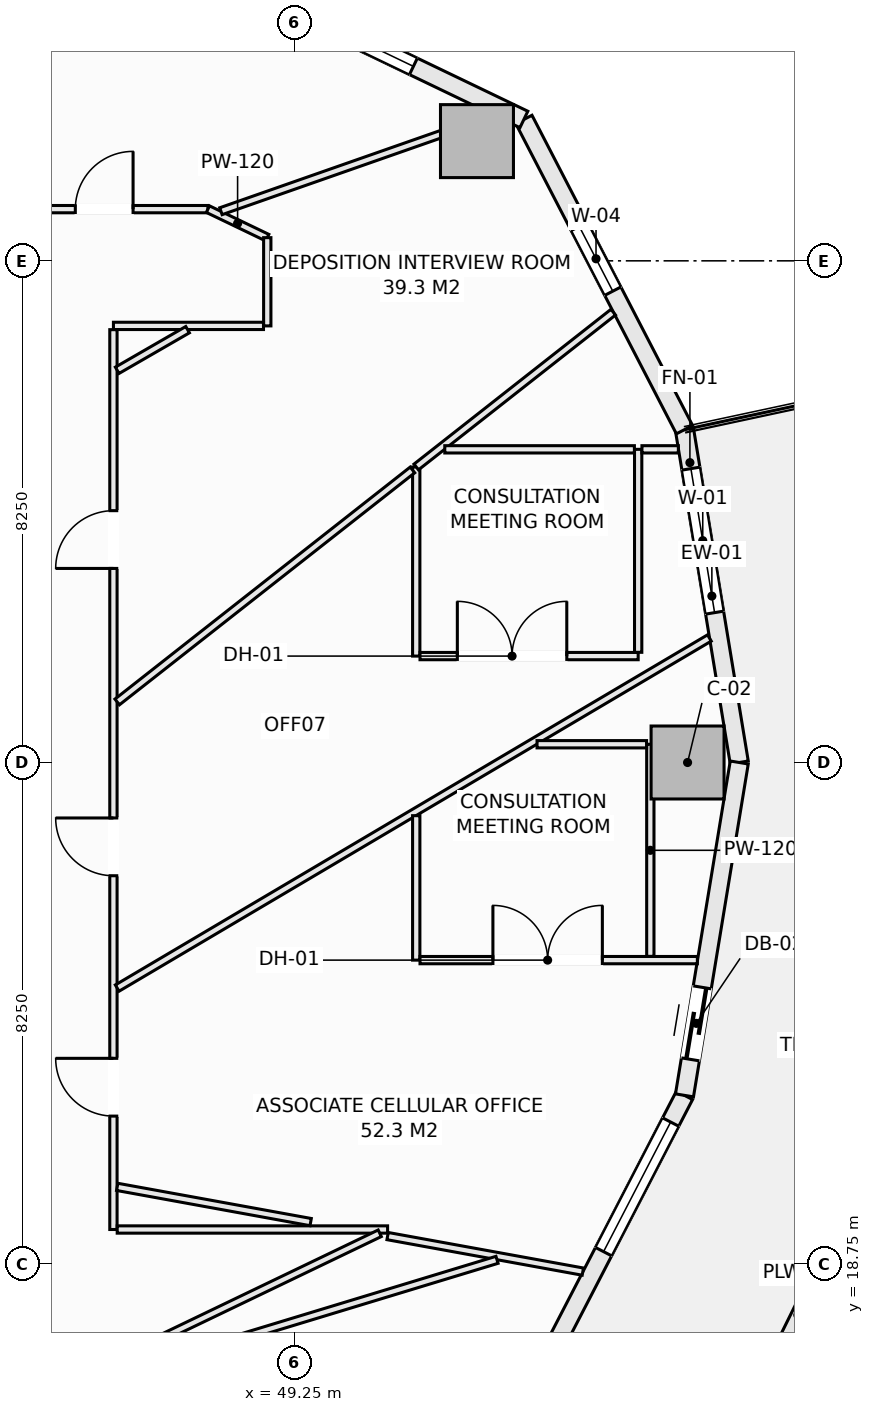
"""IFC4 building model, lengths in metres.
Left out: names, types, materials, properties, quantities, classifications, styles, units other than length and angle.
Written with IfcOpenShell. Run it as: python <this file> out.ifc"""

import sys

from ifc_helpers import new_model, si_unit, direction, frame, frame_2d, origin, origin_2d, place, context, subcontext, project, spatial, rectangle, extrude, element, fill, save


model = new_model("IFC4")
c1 = context("Model", 3, precision=1e-05, world=origin(), true_north=direction((0.0, 1.0)))
c2 = subcontext(c1, "Body", "Model", "MODEL_VIEW")
j1 = project(units=[si_unit("LENGTHUNIT", "METRE"), si_unit("PLANEANGLEUNIT", "RADIAN")], contexts=[c1])
p1 = place(None, origin())
s1 = spatial("IfcSite", under=j1, at=p1, CompositionType="ELEMENT")
p2 = place(p1, origin())
s2 = spatial("IfcBuilding", under=s1, at=p2, CompositionType="ELEMENT")
p3 = place(p2, frame((0.0, 0.0, 65.0)))
s3 = spatial("IfcBuildingStorey", under=s2, at=p3, CompositionType="ELEMENT", Elevation=65.0)
for number, where, z_axis, x_axis in (
    (1, (55.712, 27.0, -0.28), (0.0, 0.0, 1.0), (1.0, 0.0, 0.0)),
    (2, (52.249, 37.219, -0.28), (0.0, 0.0, 1.0), (1.0, 0.0, 0.0)),
):
    element("IfcColumn", number, at=place(p3, frame(where, z_axis=z_axis, x_axis=x_axis)), inside=s3, PredefinedType="COLUMN", context=c2, shape_type="SweptSolid", body=[
        extrude(rectangle(XDim=1.2, YDim=1.2, at=origin_2d()), origin(), (0.0, 0.0, 1.0), 3.85),
    ])
p4 = place(p3, frame((55.662, 32.474, 0.0), z_axis=(0.0, 0.0, 1.0), x_axis=(0.162386212206, -0.986727276447, 0.0)))
e3 = element("IfcWall", 3, at=p4, inside=s3, PredefinedType="SOLIDWALL", context=c2, shape_type="SweptSolid", body=[
    extrude(rectangle(XDim=5.548, YDim=0.3, at=frame_2d((2.774, 0.0))), origin(), (0.0, 0.0, 1.0), 3.093),
])
p5 = place(p4, frame((0.65, 0.0, 0.85)))
e4 = element("IfcOpeningElement", 4, at=p5, cuts=e3, PredefinedType="OPENING", context=c2, shape_type="SweptSolid", body=[
    extrude(rectangle(XDim=2.4, YDim=1.9, at=frame_2d((1.2, 0.95))), frame((0.0, 0.16, 0.0), z_axis=(0.0, -1.0, 0.0), x_axis=(1.0, 0.0, 0.0)), (0.0, 0.0, 1.0), 0.32),
])
p6 = place(p3, frame((53.021, 37.575, 0.0), z_axis=(0.0, 0.0, 1.0), x_axis=(0.459800981414, -0.888021991558, 0.0)))
e5 = element("IfcWall", 5, at=p6, inside=s3, PredefinedType="SOLIDWALL", context=c2, shape_type="SweptSolid", body=[
    extrude(rectangle(XDim=5.744, YDim=0.3, at=frame_2d((2.872, 0.0))), origin(), (0.0, 0.0, 1.0), 3.093),
])
p7 = place(p6, frame((1.98, 0.0, 0.72)))
e6 = element("IfcOpeningElement", 6, at=p7, cuts=e5, PredefinedType="OPENING", context=c2, shape_type="SweptSolid", body=[
    extrude(rectangle(XDim=1.2, YDim=1.65, at=frame_2d((0.6, 0.825))), frame((0.0, 0.16, 0.0), z_axis=(0.0, -1.0, 0.0), x_axis=(1.0, 0.0, 0.0)), (0.0, 0.0, 1.0), 0.32),
])
p8 = place(p3, frame((47.224, 40.36, 0.0), z_axis=(0.0, 0.0, 1.0), x_axis=(0.901354747727, -0.433081538224, 0.0)))
e7 = element("IfcWall", 7, at=p8, inside=s3, PredefinedType="SOLIDWALL", context=c2, shape_type="SweptSolid", body=[
    extrude(rectangle(XDim=6.431, YDim=0.3, at=frame_2d((3.215, 0.0))), origin(), (0.0, 0.0, 1.0), 3.093),
])
p9 = place(p8, frame((2.015, 0.0, 0.85)))
e8 = element("IfcOpeningElement", 8, at=p9, cuts=e7, PredefinedType="OPENING", context=c2, shape_type="SweptSolid", body=[
    extrude(rectangle(XDim=2.4, YDim=1.9, at=frame_2d((1.2, 0.95))), frame((0.0, 0.16, 0.0), z_axis=(0.0, -1.0, 0.0), x_axis=(1.0, 0.0, 0.0)), (0.0, 0.0, 1.0), 0.32),
])
p10 = place(p3, frame((53.021, 16.425, 0.0), z_axis=(0.0, 0.0, 1.0), x_axis=(0.459800981414, 0.888021991558, 0.0)))
e9 = element("IfcWall", 9, at=p10, inside=s3, PredefinedType="SOLIDWALL", context=c2, shape_type="SweptSolid", body=[
    extrude(rectangle(XDim=5.744, YDim=0.3, at=frame_2d((2.872, 0.0))), origin(), (0.0, 0.0, 1.0), 3.093),
])
p11 = place(p10, frame((2.85, 0.0, 0.85)))
e10 = element("IfcOpeningElement", 10, at=p11, cuts=e9, PredefinedType="OPENING", context=c2, shape_type="SweptSolid", body=[
    extrude(rectangle(XDim=2.4, YDim=1.9, at=frame_2d((1.2, 0.95))), frame((0.0, 0.16, 0.0), z_axis=(0.0, -1.0, 0.0), x_axis=(1.0, 0.0, 0.0)), (0.0, 0.0, 1.0), 0.32),
])
p12 = place(p3, frame((55.662, 21.526, 0.0), z_axis=(0.0, 0.0, 1.0), x_axis=(0.162386212206, 0.986727276447, 0.0)))
e11 = element("IfcWall", 11, at=p12, inside=s3, PredefinedType="SOLIDWALL", context=c2, shape_type="SweptSolid", body=[
    extrude(rectangle(XDim=5.548, YDim=0.3, at=frame_2d((2.774, 0.0))), origin(), (0.0, 0.0, 1.0), 3.093),
])
p13 = place(p12, frame((0.6, 0.0, 0.0)))
e12 = element("IfcOpeningElement", 12, at=p13, cuts=e11, PredefinedType="OPENING", context=c2, shape_type="SweptSolid", body=[
    extrude(rectangle(XDim=1.2, YDim=2.2, at=frame_2d((0.6, 1.1))), frame((0.0, 0.16, 0.0), z_axis=(0.0, -1.0, 0.0), x_axis=(1.0, 0.0, 0.0)), (0.0, 0.0, 1.0), 0.32),
])
p14 = place(p3, frame((56.077, 14.979, 0.0), z_axis=(0.0, 0.0, 1.0), x_axis=(0.442686636348, 0.89667638644, 0.0)))
e13 = element("IfcWall", 13, at=p14, inside=s3, PredefinedType="PARAPET", context=c2, shape_type="SweptSolid", body=[
    extrude(rectangle(XDim=6.545, YDim=0.22, at=frame_2d((3.272, 0.0))), origin(), (0.0, 0.0, 1.0), 0.52),
])
p15 = place(p3, frame((44.412, 36.1, 0.0), z_axis=(0.0, 0.0, 1.0), x_axis=(1.0, 0.0, 0.0)))
e14 = element("IfcWall", 14, at=p15, inside=s3, PredefinedType="PARTITIONING", context=c2, shape_type="SweptSolid", body=[
    extrude(rectangle(XDim=3.412, YDim=0.12, at=frame_2d((1.706, 0.0))), origin(), (0.0, 0.0, 1.0), 3.57),
])
p16 = place(p15, frame((1.231, 0.0, 0.0)))
e15 = element("IfcOpeningElement", 15, at=p16, cuts=e14, PredefinedType="OPENING", context=c2, shape_type="SweptSolid", body=[
    extrude(rectangle(XDim=0.95, YDim=2.1, at=frame_2d((0.475, 1.05))), frame((0.0, 0.07, 0.0), z_axis=(0.0, -1.0, 0.0), x_axis=(1.0, 0.0, 0.0)), (0.0, 0.0, 1.0), 0.14),
])
p17 = place(p3, frame((47.824, 36.1, 0.0), z_axis=(0.0, 0.0, 1.0), x_axis=(0.901350599951, -0.433090170712, 0.0)))
e16 = element("IfcWall", 16, at=p17, inside=s3, PredefinedType="PARTITIONING", context=c2, shape_type="SweptSolid", body=[
    extrude(rectangle(XDim=1.083, YDim=0.12, at=frame_2d((0.542, 0.0))), origin(), (0.0, 0.0, 1.0), 3.57),
])
p18 = place(p3, frame((48.8, 34.18, 0.0), z_axis=(0.0, 0.0, 1.0), x_axis=(0.0, 1.0, 0.0)))
e17 = element("IfcWall", 17, at=p18, inside=s3, PredefinedType="PARTITIONING", context=c2, shape_type="SweptSolid", body=[
    extrude(rectangle(XDim=1.451, YDim=0.12, at=frame_2d((0.726, 0.0))), origin(), (0.0, 0.0, 1.0), 3.57),
])
p19 = place(p3, frame((46.27, 34.18, 0.0), z_axis=(0.0, 0.0, 1.0), x_axis=(1.0, 0.0, 0.0)))
e18 = element("IfcWall", 18, at=p19, inside=s3, PredefinedType="PARTITIONING", context=c2, shape_type="SweptSolid", body=[
    extrude(rectangle(XDim=2.468, YDim=0.12, at=frame_2d((1.234, 0.0))), origin(), (0.0, 0.0, 1.0), 3.57),
])
p20 = place(p3, frame((46.27, 19.32, 0.0), z_axis=(0.0, 0.0, 1.0), x_axis=(0.0, 1.0, 0.0)))
e19 = element("IfcWall", 19, at=p20, inside=s3, PredefinedType="PARTITIONING", context=c2, shape_type="SweptSolid", body=[
    extrude(rectangle(XDim=14.798, YDim=0.12, at=frame_2d((7.399, 0.0))), origin(), (0.0, 0.0, 1.0), 3.57),
])
p21 = place(p20, frame((1.865, 0.0, 0.0)))
e20 = element("IfcOpeningElement", 20, at=p21, cuts=e19, PredefinedType="OPENING", context=c2, shape_type="SweptSolid", body=[
    extrude(rectangle(XDim=0.95, YDim=2.1, at=frame_2d((0.475, 1.05))), frame((0.0, 0.07, 0.0), z_axis=(0.0, -1.0, 0.0), x_axis=(1.0, 0.0, 0.0)), (0.0, 0.0, 1.0), 0.14),
])
p22 = place(p20, frame((5.818, 0.0, 0.0)))
e21 = element("IfcOpeningElement", 21, at=p22, cuts=e19, PredefinedType="OPENING", context=c2, shape_type="SweptSolid", body=[
    extrude(rectangle(XDim=0.95, YDim=2.1, at=frame_2d((0.475, 1.05))), frame((0.0, 0.07, 0.0), z_axis=(0.0, -1.0, 0.0), x_axis=(1.0, 0.0, 0.0)), (0.0, 0.0, 1.0), 0.14),
])
p23 = place(p20, frame((10.871, 0.0, 0.0)))
e22 = element("IfcOpeningElement", 22, at=p23, cuts=e19, PredefinedType="OPENING", context=c2, shape_type="SweptSolid", body=[
    extrude(rectangle(XDim=0.95, YDim=2.1, at=frame_2d((0.475, 1.05))), frame((0.0, 0.07, 0.0), z_axis=(0.0, -1.0, 0.0), x_axis=(1.0, 0.0, 0.0)), (0.0, 0.0, 1.0), 0.14),
])
p24 = place(p3, frame((46.332, 19.32, 0.0), z_axis=(0.0, 0.0, 1.0), x_axis=(1.0, 0.0, 0.0)))
e23 = element("IfcWall", 23, at=p24, inside=s3, PredefinedType="PARTITIONING", context=c2, shape_type="SweptSolid", body=[
    extrude(rectangle(XDim=4.447, YDim=0.12, at=frame_2d((2.224, 0.0))), origin(), (0.0, 0.0, 1.0), 3.205),
])
p25 = place(p3, frame((46.783, 17.4, 0.0), z_axis=(0.0, 0.0, 1.0), x_axis=(0.901339159108, 0.433113980679, 0.0)))
e24 = element("IfcWall", 24, at=p25, inside=s3, PredefinedType="PARTITIONING", context=c2, shape_type="SweptSolid", body=[
    extrude(rectangle(XDim=4.29, YDim=0.12, at=frame_2d((2.145, 0.0))), origin(), (0.0, 0.0, 1.0), 3.57),
])
p26 = place(p3, frame((46.332, 20.021, 0.0), z_axis=(0.0, 0.0, 1.0), x_axis=(0.983836071263, -0.17907145189, 0.0)))
e25 = element("IfcWall", 25, at=p26, inside=s3, PredefinedType="PARTITIONING", context=c2, shape_type="SweptSolid", body=[
    extrude(rectangle(XDim=3.234, YDim=0.12, at=frame_2d((1.617, 0.0))), origin(), (0.0, 0.0, 1.0), 3.57),
])
p27 = place(p3, frame((50.779, 19.212, 0.0), z_axis=(0.0, 0.0, 1.0), x_axis=(0.983831584621, -0.179096100189, 0.0)))
e26 = element("IfcWall", 26, at=p27, inside=s3, PredefinedType="PARTITIONING", context=c2, shape_type="SweptSolid", body=[
    extrude(rectangle(XDim=3.263, YDim=0.12, at=frame_2d((1.632, 0.0))), origin(), (0.0, 0.0, 1.0), 3.57),
])
p28 = place(p3, frame((36.012, 13.79, 0.0), z_axis=(0.0, 0.0, 1.0), x_axis=(0.95683920317, 0.290617857809, 0.0)))
e27 = element("IfcWall", 27, at=p28, inside=s3, PredefinedType="PARTITIONING", context=c2, shape_type="SweptSolid", body=[
    extrude(rectangle(XDim=17.314, YDim=0.12, at=frame_2d((8.657, 0.0))), origin(), (0.0, 0.0, 1.0), 3.57),
])
p29 = place(p3, frame((46.332, 23.29, 0.0), z_axis=(0.0, 0.0, 1.0), x_axis=(0.860842745888, 0.508871070953, 0.0)))
e28 = element("IfcWall", 28, at=p29, inside=s3, PredefinedType="PARTITIONING", context=c2, shape_type="SweptSolid", body=[
    extrude(rectangle(XDim=11.314, YDim=0.12, at=frame_2d((5.657, 0.0))), origin(), (0.0, 0.0, 1.0), 2.934),
])
p30 = place(p3, frame((51.25, 23.75, 0.0), z_axis=(0.0, 0.0, 1.0), x_axis=(0.0, 1.0, 0.0)))
e29 = element("IfcWall", 29, at=p30, inside=s3, PredefinedType="PARTITIONING", context=c2, shape_type="SweptSolid", body=[
    extrude(rectangle(XDim=2.375, YDim=0.12, at=frame_2d((1.188, 0.0))), origin(), (0.0, 0.0, 1.0), 3.57),
])
p31 = place(p3, frame((51.25, 28.75, 0.0), z_axis=(0.0, 0.0, 1.0), x_axis=(0.0, 1.0, 0.0)))
e30 = element("IfcWall", 30, at=p31, inside=s3, PredefinedType="PARTITIONING", context=c2, shape_type="SweptSolid", body=[
    extrude(rectangle(XDim=3.11, YDim=0.12, at=frame_2d((1.555, 0.0))), origin(), (0.0, 0.0, 1.0), 3.57),
])
p32 = place(p3, frame((51.312, 23.75, 0.0), z_axis=(0.0, 0.0, 1.0), x_axis=(1.0, 0.0, 0.0)))
e31 = element("IfcWall", 31, at=p32, inside=s3, PredefinedType="PARTITIONING", context=c2, shape_type="SweptSolid", body=[
    extrude(rectangle(XDim=4.562, YDim=0.12, at=frame_2d((2.281, 0.0))), origin(), (0.0, 0.0, 1.0), 3.57),
])
p33 = place(p32, frame((1.199, 0.0, 0.0)))
e32 = element("IfcOpeningElement", 32, at=p33, cuts=e31, PredefinedType="OPENING", context=c2, shape_type="SweptSolid", body=[
    extrude(rectangle(XDim=1.8, YDim=2.3, at=frame_2d((0.9, 1.15))), frame((0.0, 0.07, 0.0), z_axis=(0.0, -1.0, 0.0), x_axis=(1.0, 0.0, 0.0)), (0.0, 0.0, 1.0), 0.14),
])
p34 = place(p3, frame((55.1, 23.812, 0.0), z_axis=(0.0, 0.0, 1.0), x_axis=(0.0, 1.0, 0.0)))
e33 = element("IfcWall", 33, at=p34, inside=s3, PredefinedType="PARTITIONING", context=c2, shape_type="SweptSolid", body=[
    extrude(rectangle(XDim=3.488, YDim=0.12, at=frame_2d((1.744, 0.0))), origin(), (0.0, 0.0, 1.0), 3.093),
])
p35 = place(p3, frame((53.237, 27.3, 0.0), z_axis=(0.0, 0.0, 1.0), x_axis=(1.0, 0.0, 0.0)))
e34 = element("IfcWall", 34, at=p35, inside=s3, PredefinedType="PARTITIONING", context=c2, shape_type="SweptSolid", body=[
    extrude(rectangle(XDim=1.801, YDim=0.12, at=frame_2d((0.901, 0.0))), origin(), (0.0, 0.0, 1.0), 3.57),
])
p36 = place(p3, frame((46.332, 27.996, 0.0), z_axis=(0.0, 0.0, 1.0), x_axis=(0.786296389823, 0.617849486, 0.0)))
e35 = element("IfcWall", 35, at=p36, inside=s3, PredefinedType="PARTITIONING", context=c2, shape_type="SweptSolid", body=[
    extrude(rectangle(XDim=6.176, YDim=0.12, at=frame_2d((3.088, 0.0))), origin(), (0.0, 0.0, 1.0), 3.57),
])
p37 = place(p3, frame((51.25, 31.86, 0.0), z_axis=(0.0, 0.0, 1.0), x_axis=(0.786318338822, 0.617821551932, 0.0)))
e36 = element("IfcWall", 36, at=p37, inside=s3, PredefinedType="PARTITIONING", context=c2, shape_type="SweptSolid", body=[
    extrude(rectangle(XDim=4.121, YDim=0.12, at=frame_2d((2.061, 0.0))), origin(), (0.0, 0.0, 1.0), 3.57),
])
p38 = place(p3, frame((51.312, 28.75, 0.0), z_axis=(0.0, 0.0, 1.0), x_axis=(1.0, 0.0, 0.0)))
e37 = element("IfcWall", 37, at=p38, inside=s3, PredefinedType="PARTITIONING", context=c2, shape_type="SweptSolid", body=[
    extrude(rectangle(XDim=3.588, YDim=0.12, at=frame_2d((1.794, 0.0))), origin(), (0.0, 0.0, 1.0), 3.57),
])
p39 = place(p38, frame((0.614, 0.0, 0.0)))
e38 = element("IfcOpeningElement", 38, at=p39, cuts=e37, PredefinedType="OPENING", context=c2, shape_type="SweptSolid", body=[
    extrude(rectangle(XDim=1.8, YDim=2.3, at=frame_2d((0.9, 1.15))), frame((0.0, 0.07, 0.0), z_axis=(0.0, -1.0, 0.0), x_axis=(1.0, 0.0, 0.0)), (0.0, 0.0, 1.0), 0.14),
])
p40 = place(p3, frame((54.9, 28.812, 0.0), z_axis=(0.0, 0.0, 1.0), x_axis=(0.0, 1.0, 0.0)))
e39 = element("IfcWall", 39, at=p40, inside=s3, PredefinedType="PARTITIONING", context=c2, shape_type="SweptSolid", body=[
    extrude(rectangle(XDim=3.338, YDim=0.12, at=frame_2d((1.669, 0.0))), origin(), (0.0, 0.0, 1.0), 3.093),
])
p41 = place(p3, frame((51.719, 32.15, 0.0), z_axis=(0.0, 0.0, 1.0), x_axis=(1.0, 0.0, 0.0)))
e40 = element("IfcWall", 40, at=p41, inside=s3, PredefinedType="PARTITIONING", context=c2, shape_type="SweptSolid", body=[
    extrude(rectangle(XDim=3.118, YDim=0.12, at=frame_2d((1.559, 0.0))), origin(), (0.0, 0.0, 1.0), 3.57),
])
p42 = place(p3, frame((54.962, 32.15, 0.0), z_axis=(0.0, 0.0, 1.0), x_axis=(1.0, 0.0, 0.0)))
e41 = element("IfcWall", 41, at=p42, inside=s3, PredefinedType="PARTITIONING", context=c2, shape_type="SweptSolid", body=[
    extrude(rectangle(XDim=0.599, YDim=0.12, at=frame_2d((0.3, 0.0))), origin(), (0.0, 0.0, 1.0), 3.57),
])
p43 = place(p3, frame((46.332, 33.45, 0.0), z_axis=(0.0, 0.0, 1.0), x_axis=(0.866042617247, 0.499970184224, 0.0)))
e42 = element("IfcWall", 42, at=p43, inside=s3, PredefinedType="PARTITIONING", context=c2, shape_type="SweptSolid", body=[
    extrude(rectangle(XDim=1.336, YDim=0.12, at=frame_2d((0.668, 0.0))), origin(), (0.0, 0.0, 1.0), 3.57),
])
p44 = place(p3, frame((48.038, 36.066, 0.0), z_axis=(0.0, 0.0, 1.0), x_axis=(0.943787214576, 0.330553616836, 0.0)))
e43 = element("IfcWall", 43, at=p44, inside=s3, PredefinedType="PARTITIONING", context=c2, shape_type="SweptSolid", body=[
    extrude(rectangle(XDim=4.763, YDim=0.12, at=frame_2d((2.382, 0.0))), origin(), (0.0, 0.0, 1.0), 3.57),
])
p45 = place(p5, origin())
e44 = element("IfcWindow", 44, at=p45, inside=s3, PartitioningType="SINGLE_PANEL", PredefinedType="WINDOW", context=c2, shape_type="SweptSolid", body=[
    extrude(rectangle(XDim=2.4, YDim=1.9, at=frame_2d((1.2, 0.95))), frame((0.0, 0.03, 0.0), z_axis=(0.0, -1.0, 0.0), x_axis=(1.0, 0.0, 0.0)), (0.0, 0.0, 1.0), 0.06),
])
fill(e4, e44)
p46 = place(p7, origin())
e45 = element("IfcWindow", 45, at=p46, inside=s3, PartitioningType="SINGLE_PANEL", PredefinedType="WINDOW", context=c2, shape_type="SweptSolid", body=[
    extrude(rectangle(XDim=1.2, YDim=1.65, at=frame_2d((0.6, 0.825))), frame((0.0, 0.03, 0.0), z_axis=(0.0, -1.0, 0.0), x_axis=(1.0, 0.0, 0.0)), (0.0, 0.0, 1.0), 0.06),
])
fill(e6, e45)
p47 = place(p9, origin())
e46 = element("IfcWindow", 46, at=p47, inside=s3, PartitioningType="SINGLE_PANEL", PredefinedType="WINDOW", context=c2, shape_type="SweptSolid", body=[
    extrude(rectangle(XDim=2.4, YDim=1.9, at=frame_2d((1.2, 0.95))), frame((0.0, 0.03, 0.0), z_axis=(0.0, -1.0, 0.0), x_axis=(1.0, 0.0, 0.0)), (0.0, 0.0, 1.0), 0.06),
])
fill(e8, e46)
p48 = place(p11, origin())
e47 = element("IfcWindow", 47, at=p48, inside=s3, PartitioningType="SINGLE_PANEL", PredefinedType="WINDOW", context=c2, shape_type="SweptSolid", body=[
    extrude(rectangle(XDim=2.4, YDim=1.9, at=frame_2d((1.2, 0.95))), frame((0.0, 0.03, 0.0), z_axis=(0.0, -1.0, 0.0), x_axis=(1.0, 0.0, 0.0)), (0.0, 0.0, 1.0), 0.06),
])
fill(e10, e47)
p49 = place(p13, frame((1.2, 0.0, 0.0), z_axis=(0.0, 0.0, 1.0), x_axis=(-1.0, 0.0, 0.0)))
e48 = element("IfcDoor", 48, at=p49, inside=s3, OperationType="SLIDING_TO_LEFT", PredefinedType="DOOR", context=c2, shape_type="SweptSolid", body=[
    extrude(rectangle(XDim=1.2, YDim=2.2, at=frame_2d((0.6, 1.1))), frame((0.0, 0.025, 0.0), z_axis=(0.0, -1.0, 0.0), x_axis=(1.0, 0.0, 0.0)), (0.0, 0.0, 1.0), 0.05),
])
fill(e12, e48)
p50 = place(p21, origin())
e49 = element("IfcDoor", 49, at=p50, inside=s3, OperationType="SINGLE_SWING_RIGHT", PredefinedType="DOOR", context=c2, shape_type="SweptSolid", body=[
    extrude(rectangle(XDim=0.95, YDim=2.1, at=frame_2d((0.475, 1.05))), frame((0.0, 0.025, 0.0), z_axis=(0.0, -1.0, 0.0), x_axis=(1.0, 0.0, 0.0)), (0.0, 0.0, 1.0), 0.05),
])
fill(e20, e49)
p51 = place(p22, origin())
e50 = element("IfcDoor", 50, at=p51, inside=s3, OperationType="SINGLE_SWING_RIGHT", PredefinedType="DOOR", context=c2, shape_type="SweptSolid", body=[
    extrude(rectangle(XDim=0.95, YDim=2.1, at=frame_2d((0.475, 1.05))), frame((0.0, 0.025, 0.0), z_axis=(0.0, -1.0, 0.0), x_axis=(1.0, 0.0, 0.0)), (0.0, 0.0, 1.0), 0.05),
])
fill(e21, e50)
p52 = place(p23, origin())
e51 = element("IfcDoor", 51, at=p52, inside=s3, OperationType="SINGLE_SWING_LEFT", PredefinedType="DOOR", context=c2, shape_type="SweptSolid", body=[
    extrude(rectangle(XDim=0.95, YDim=2.1, at=frame_2d((0.475, 1.05))), frame((0.0, 0.025, 0.0), z_axis=(0.0, -1.0, 0.0), x_axis=(1.0, 0.0, 0.0)), (0.0, 0.0, 1.0), 0.05),
])
fill(e22, e51)
p53 = place(p16, origin())
e52 = element("IfcDoor", 52, at=p53, inside=s3, OperationType="SINGLE_SWING_RIGHT", PredefinedType="DOOR", context=c2, shape_type="SweptSolid", body=[
    extrude(rectangle(XDim=0.95, YDim=2.1, at=frame_2d((0.475, 1.05))), frame((0.0, 0.025, 0.0), z_axis=(0.0, -1.0, 0.0), x_axis=(1.0, 0.0, 0.0)), (0.0, 0.0, 1.0), 0.05),
])
fill(e15, e52)
p54 = place(p33, origin())
e53 = element("IfcDoor", 53, at=p54, inside=s3, OperationType="DOUBLE_DOOR_SINGLE_SWING", PredefinedType="DOOR", context=c2, shape_type="SweptSolid", body=[
    extrude(rectangle(XDim=1.8, YDim=2.3, at=frame_2d((0.9, 1.15))), frame((0.0, 0.025, 0.0), z_axis=(0.0, -1.0, 0.0), x_axis=(1.0, 0.0, 0.0)), (0.0, 0.0, 1.0), 0.05),
])
fill(e32, e53)
p55 = place(p39, origin())
e54 = element("IfcDoor", 54, at=p55, inside=s3, OperationType="DOUBLE_DOOR_SINGLE_SWING", PredefinedType="DOOR", context=c2, shape_type="SweptSolid", body=[
    extrude(rectangle(XDim=1.8, YDim=2.3, at=frame_2d((0.9, 1.15))), frame((0.0, 0.025, 0.0), z_axis=(0.0, -1.0, 0.0), x_axis=(1.0, 0.0, 0.0)), (0.0, 0.0, 1.0), 0.05),
])
fill(e38, e54)
save(model, sys.argv[1])
